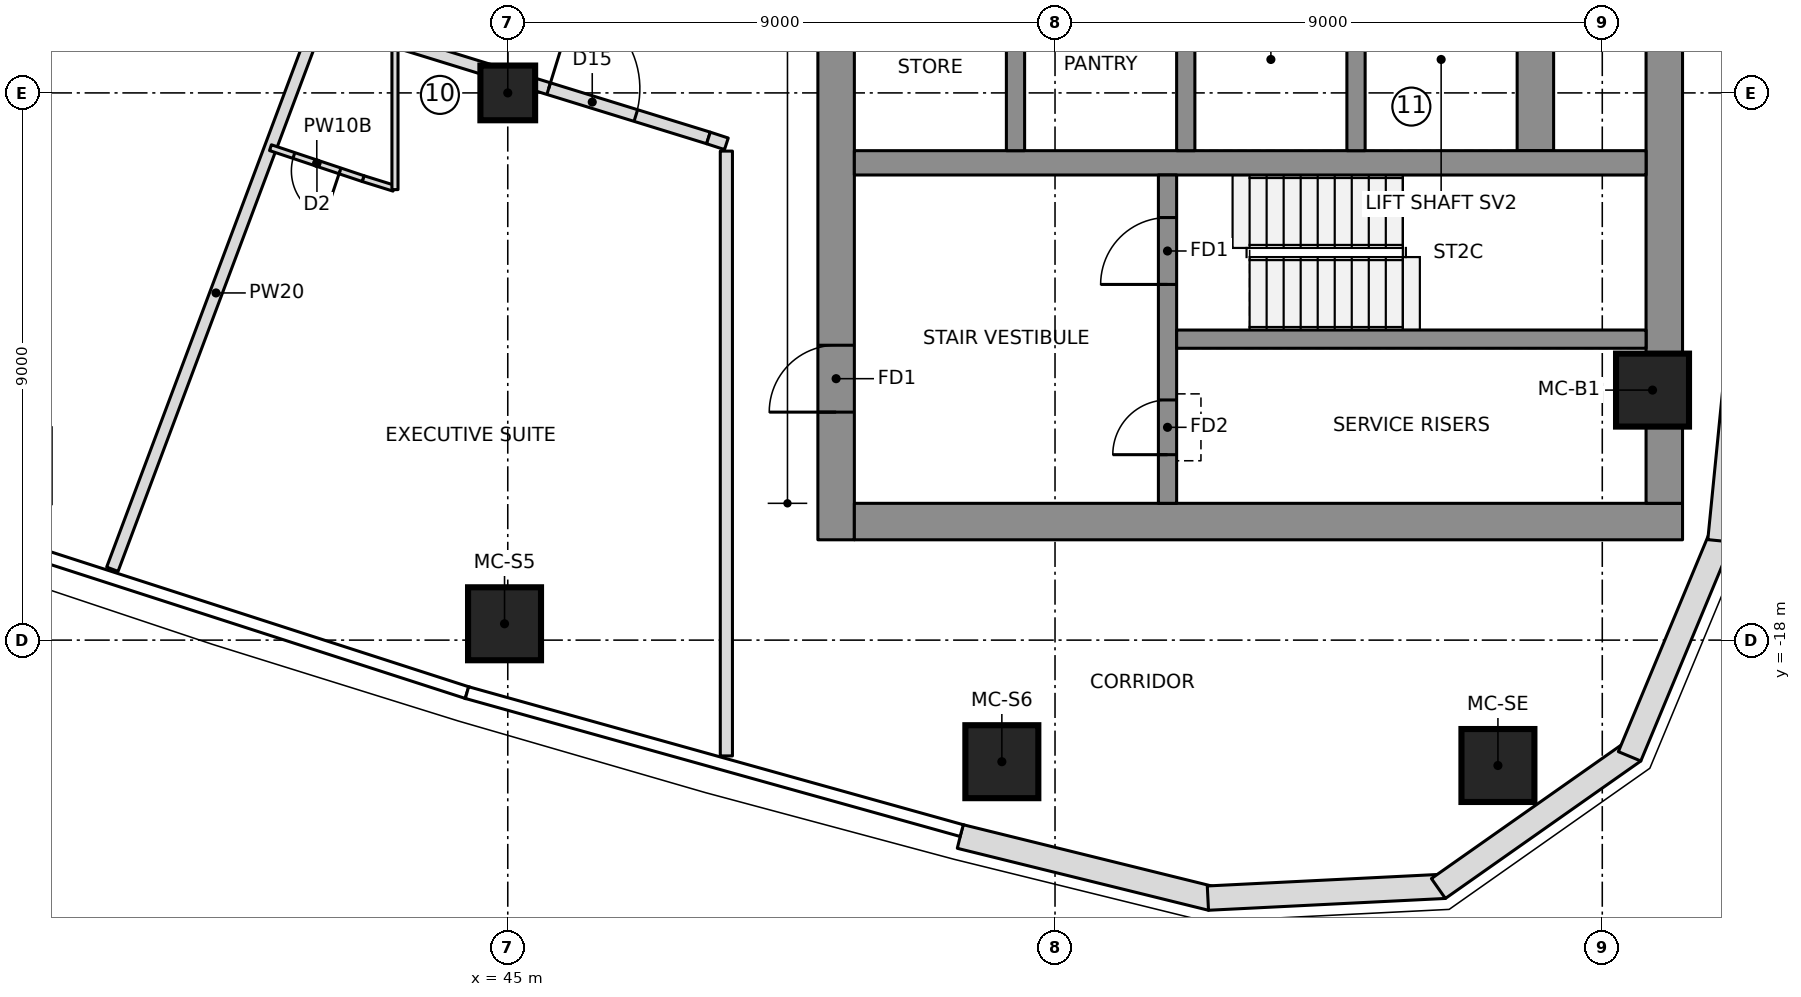
"""IFC4 building model, lengths in metres.
Left out: names, types, materials, properties, quantities, classifications, styles, units other than length and angle.
Written with IfcOpenShell. Run it as: python <this file> out.ifc"""

import sys

from ifc_helpers import new_model, si_unit, direction, frame, frame_2d, origin, origin_2d, place, context, subcontext, project, spatial, polyline, rectangle, outline, extrude, element, fill, save


model = new_model("IFC4")
c1 = context("Model", 3, precision=1e-05, world=origin(), true_north=direction((0.0, 1.0)))
c2 = subcontext(c1, "Body", "Model", "MODEL_VIEW")
j1 = project(units=[si_unit("LENGTHUNIT", "METRE"), si_unit("PLANEANGLEUNIT", "RADIAN")], contexts=[c1])
p1 = place(None, origin())
s1 = spatial("IfcSite", under=j1, at=p1, CompositionType="ELEMENT")
p2 = place(p1, origin())
s2 = spatial("IfcBuilding", under=s1, at=p2, CompositionType="ELEMENT")
p3 = place(p2, frame((0.0, 0.0, 231.45)))
s3 = spatial("IfcBuildingStorey", under=s2, at=p3, CompositionType="ELEMENT", Elevation=231.45)
p4 = place(p3, frame((50.4, -16.35, 0.0), z_axis=(0.0, 0.0, 1.0), x_axis=(0.0, 1.0, 0.0)))
e1 = element("IfcWall", 1, at=p4, inside=s3, PredefinedType="SHEAR", context=c2, shape_type="SweptSolid", body=[
    extrude(rectangle(XDim=9.7, YDim=0.6, at=frame_2d((4.85, 0.0))), origin(), (0.0, 0.0, 1.0), 3.55),
])
p5 = place(p4, frame((2.1, 0.0, 0.0)))
e2 = element("IfcOpeningElement", 2, at=p5, cuts=e1, PredefinedType="OPENING", context=c2, shape_type="SweptSolid", body=[
    extrude(rectangle(XDim=1.1, YDim=2.1, at=frame_2d((0.55, 1.05))), frame((0.0, 0.31, 0.0), z_axis=(0.0, -1.0, 0.0), x_axis=(1.0, 0.0, 0.0)), (0.0, 0.0, 1.0), 0.62),
])
p6 = place(p3, frame((50.7, -16.05, 0.0), z_axis=(0.0, 0.0, 1.0), x_axis=(1.0, 0.0, 0.0)))
e3 = element("IfcWall", 3, at=p6, inside=s3, PredefinedType="SHEAR", context=c2, shape_type="SweptSolid", body=[
    extrude(rectangle(XDim=13.62, YDim=0.6, at=frame_2d((6.81, 0.0))), origin(), (0.0, 0.0, 1.0), 3.55),
])
p7 = place(p3, frame((64.02, -15.75, 0.0), z_axis=(0.0, 0.0, 1.0), x_axis=(0.0, 1.0, 0.0)))
e4 = element("IfcWall", 4, at=p7, inside=s3, PredefinedType="SHEAR", context=c2, shape_type="SweptSolid", body=[
    extrude(rectangle(XDim=8.248, YDim=0.6, at=frame_2d((4.124, 0.0))), origin(), (0.0, 0.0, 1.0), 3.55),
])
p8 = place(p3, frame((61.9, -9.95, 0.0), z_axis=(0.0, 0.0, 1.0), x_axis=(0.0, 1.0, 0.0)))
e5 = element("IfcWall", 5, at=p8, inside=s3, PredefinedType="SHEAR", context=c2, shape_type="SweptSolid", body=[
    extrude(rectangle(XDim=19.9, YDim=0.6, at=frame_2d((9.95, 0.0))), origin(), (0.0, 0.0, 1.0), 3.55),
])
p9 = place(p3, frame((50.7, -10.15, 0.0), z_axis=(0.0, 0.0, 1.0), x_axis=(1.0, 0.0, 0.0)))
e6 = element("IfcWall", 6, at=p9, inside=s3, PredefinedType="SHEAR", context=c2, shape_type="SweptSolid", body=[
    extrude(rectangle(XDim=13.02, YDim=0.4, at=frame_2d((6.51, 0.0))), origin(), (0.0, 0.0, 1.0), 3.55),
])
for number, where, z_axis, x_axis in (
    (7, (53.35, -9.95, 0.0), (0.0, 0.0, 1.0), (0.0, 1.0, 0.0)),
    (8, (56.15, -9.95, 0.0), (0.0, 0.0, 1.0), (0.0, 1.0, 0.0)),
    (9, (58.95, -9.95, 0.0), (0.0, 0.0, 1.0), (0.0, 1.0, 0.0)),
):
    element("IfcWall", number, at=place(p3, frame(where, z_axis=z_axis, x_axis=x_axis)), inside=s3, PredefinedType="SHEAR", context=c2, shape_type="SweptSolid", body=[
        extrude(rectangle(XDim=3.0, YDim=0.3, at=frame_2d((1.5, 0.0))), origin(), (0.0, 0.0, 1.0), 3.55),
    ])
p10 = place(p3, frame((55.85, -15.75, 0.0), z_axis=(0.0, 0.0, 1.0), x_axis=(0.0, 1.0, 0.0)))
e10 = element("IfcWall", 10, at=p10, inside=s3, PredefinedType="SHEAR", context=c2, shape_type="SweptSolid", body=[
    extrude(rectangle(XDim=5.4, YDim=0.3, at=frame_2d((2.7, 0.0))), origin(), (0.0, 0.0, 1.0), 3.55),
])
p11 = place(p10, frame((3.6, 0.0, 0.0)))
e11 = element("IfcOpeningElement", 11, at=p11, cuts=e10, PredefinedType="OPENING", context=c2, shape_type="SweptSolid", body=[
    extrude(rectangle(XDim=1.1, YDim=2.1, at=frame_2d((0.55, 1.05))), frame((0.0, 0.16, 0.0), z_axis=(0.0, -1.0, 0.0), x_axis=(1.0, 0.0, 0.0)), (0.0, 0.0, 1.0), 0.32),
])
p12 = place(p10, frame((0.8, 0.0, 0.0)))
e12 = element("IfcOpeningElement", 12, at=p12, cuts=e10, PredefinedType="OPENING", context=c2, shape_type="SweptSolid", body=[
    extrude(rectangle(XDim=0.9, YDim=2.1, at=frame_2d((0.45, 1.05))), frame((0.0, 0.16, 0.0), z_axis=(0.0, -1.0, 0.0), x_axis=(1.0, 0.0, 0.0)), (0.0, 0.0, 1.0), 0.32),
])
p13 = place(p3, frame((56.0, -13.05, 0.0), z_axis=(0.0, 0.0, 1.0), x_axis=(1.0, 0.0, 0.0)))
e13 = element("IfcWall", 13, at=p13, inside=s3, PredefinedType="SHEAR", context=c2, shape_type="SweptSolid", body=[
    extrude(rectangle(XDim=7.72, YDim=0.3, at=frame_2d((3.86, 0.0))), origin(), (0.0, 0.0, 1.0), 3.55),
])
for number, where, z_axis, x_axis in (
    (14, (44.947, -17.731, 0.0), (0.0, 0.0, 1.0), (1.0, 0.0, 0.0)),
    (15, (53.125, -20.0, 0.0), (0.0, 0.0, 1.0), (1.0, 0.0, 0.0)),
    (16, (61.284, -20.062, 0.0), (0.0, 0.0, 1.0), (1.0, 0.0, 0.0)),
    (17, (63.826, -13.888, 0.0), (0.0, 0.0, 1.0), (1.0, 0.0, 0.0)),
):
    element("IfcColumn", number, at=place(p3, frame(where, z_axis=z_axis, x_axis=x_axis)), inside=s3, PredefinedType="COLUMN", context=c2, shape_type="SweptSolid", body=[
        extrude(rectangle(XDim=1.2, YDim=1.2, at=origin_2d()), origin(), (0.0, 0.0, 1.0), 3.55),
    ])
p14 = place(p3, frame((45.0, -9.0, 0.0), z_axis=(0.0, 0.0, 1.0), x_axis=(1.0, 0.0, 0.0)))
e18 = element("IfcColumn", 18, at=p14, inside=s3, PredefinedType="COLUMN", context=c2, shape_type="SweptSolid", body=[
    extrude(rectangle(XDim=0.9, YDim=0.9, at=origin_2d()), origin(), (0.0, 0.0, 1.0), 3.55),
])
p15 = place(p3, frame((52.441, -21.23, 0.0), z_axis=(0.0, 0.0, 1.0), x_axis=(0.970902342456, -0.23947576373, 0.0)))
e19 = element("IfcWall", 19, at=p15, inside=s3, PredefinedType="NOTDEFINED", context=c2, shape_type="SweptSolid", body=[
    extrude(outline(polyline([(0.0, -0.2), (4.255, -0.2), (4.197, 0.2), (0.0, 0.2), (0.0, -0.2)])), origin(), (0.0, 0.0, 1.0), 3.25),
])
p16 = place(p3, frame((56.543, -22.242, 0.0), z_axis=(0.0, 0.0, 1.0), x_axis=(0.998758875872, 0.049806705046, 0.0)))
e20 = element("IfcWall", 20, at=p16, inside=s3, PredefinedType="NOTDEFINED", context=c2, shape_type="SweptSolid", body=[
    extrude(outline(polyline([(-0.029, -0.2), (3.871, -0.2), (3.756, 0.2), (0.029, 0.2), (-0.029, -0.2)])), origin(), (0.0, 0.0, 1.0), 3.25),
])
p17 = place(p3, frame((60.352, -22.052, 0.0), z_axis=(0.0, 0.0, 1.0), x_axis=(0.817942545532, 0.575299915009, 0.0)))
e21 = element("IfcWall", 21, at=p17, inside=s3, PredefinedType="NOTDEFINED", context=c2, shape_type="SweptSolid", body=[
    extrude(outline(polyline([(-0.058, -0.2), (3.871, -0.2), (3.756, 0.2), (0.058, 0.2), (-0.058, -0.2)])), origin(), (0.0, 0.0, 1.0), 3.25),
])
p18 = place(p3, frame((63.471, -19.858, 0.0), z_axis=(0.0, 0.0, 1.0), x_axis=(0.3844335483, 0.923152667191, 0.0)))
e22 = element("IfcWall", 22, at=p18, inside=s3, PredefinedType="NOTDEFINED", context=c2, shape_type="SweptSolid", body=[
    extrude(outline(polyline([(-0.058, -0.2), (3.843, -0.2), (3.784, 0.2), (0.058, 0.2), (-0.058, -0.2)])), origin(), (0.0, 0.0, 1.0), 3.25),
])
p19 = place(p3, frame((64.938, -16.337, 0.0), z_axis=(0.0, 0.0, 1.0), x_axis=(0.098718218066, 0.995115427185, 0.0)))
e23 = element("IfcWall", 23, at=p19, inside=s3, PredefinedType="NOTDEFINED", context=c2, shape_type="SweptSolid", body=[
    extrude(outline(polyline([(-0.03, -0.2), (4.096, -0.2), (4.09, 0.2), (0.03, 0.2), (-0.03, -0.2)])), origin(), (0.0, 0.0, 1.0), 3.25),
])
p20 = place(p3, frame((38.497, -16.834, 0.0), z_axis=(0.0, 0.0, 1.0), x_axis=(0.35112895446, 0.936327110224, 0.0)))
e24 = element("IfcWall", 24, at=p20, inside=s3, PredefinedType="PARTITIONING", context=c2, shape_type="SweptSolid", body=[
    extrude(rectangle(XDim=9.706, YDim=0.2, at=frame_2d((4.853, 0.0))), origin(), (0.0, 0.0, 1.0), 3.25),
])
p21 = place(p3, frame((43.128, -10.568, 0.0), z_axis=(0.0, 0.0, 1.0), x_axis=(-0.954618903587, 0.297830067176, 0.0)))
e25 = element("IfcWall", 25, at=p21, inside=s3, PredefinedType="PARTITIONING", context=c2, shape_type="SweptSolid", body=[
    extrude(rectangle(XDim=0.531, YDim=0.1, at=frame_2d((0.266, 0.0))), origin(), (0.0, 0.0, 1.0), 3.25),
])
p22 = place(p3, frame((42.621, -10.409, 0.0), z_axis=(0.0, 0.0, 1.0), x_axis=(-0.948485479965, 0.3168206027, 0.0)))
e26 = element("IfcWall", 26, at=p22, inside=s3, PredefinedType="PARTITIONING", context=c2, shape_type="SweptSolid", body=[
    extrude(rectangle(XDim=1.606, YDim=0.1, at=frame_2d((0.803, 0.0))), origin(), (0.0, 0.0, 1.0), 3.25),
])
p23 = place(p22, frame((0.4, 0.0, 0.0)))
e27 = element("IfcOpeningElement", 27, at=p23, cuts=e26, PredefinedType="OPENING", context=c2, shape_type="SweptSolid", body=[
    extrude(rectangle(XDim=0.8, YDim=2.1, at=frame_2d((0.4, 1.05))), frame((0.0, 0.06, 0.0), z_axis=(0.0, -1.0, 0.0), x_axis=(1.0, 0.0, 0.0)), (0.0, 0.0, 1.0), 0.12),
])
p24 = place(p3, frame((43.145, -8.165, 0.0), z_axis=(0.0, 0.0, 1.0), x_axis=(0.0, -1.0, 0.0)))
e28 = element("IfcWall", 28, at=p24, inside=s3, PredefinedType="PARTITIONING", context=c2, shape_type="SweptSolid", body=[
    extrude(rectangle(XDim=2.425, YDim=0.1, at=frame_2d((1.213, 0.0))), origin(), (0.0, 0.0, 1.0), 3.25),
])
p25 = place(p3, frame((41.898, -7.764, 0.0), z_axis=(0.0, 0.0, 1.0), x_axis=(0.955502033518, -0.294984514752, 0.0)))
e29 = element("IfcWall", 29, at=p25, inside=s3, PredefinedType="PARTITIONING", context=c2, shape_type="SweptSolid", body=[
    extrude(rectangle(XDim=6.7, YDim=0.2, at=frame_2d((3.35, 0.0))), origin(), (0.0, 0.0, 1.0), 3.25),
])
p26 = place(p25, frame((3.95, 0.0, 0.0)))
e30 = element("IfcOpeningElement", 30, at=p26, cuts=e29, PredefinedType="OPENING", context=c2, shape_type="SweptSolid", body=[
    extrude(rectangle(XDim=1.5, YDim=2.1, at=frame_2d((0.75, 1.05))), frame((0.0, 0.11, 0.0), z_axis=(0.0, -1.0, 0.0), x_axis=(1.0, 0.0, 0.0)), (0.0, 0.0, 1.0), 0.22),
])
p27 = place(p3, frame((48.3, -9.741, 0.0), z_axis=(0.0, 0.0, 1.0), x_axis=(0.950709666312, -0.31008245739, 0.0)))
e31 = element("IfcWall", 31, at=p27, inside=s3, PredefinedType="PARTITIONING", context=c2, shape_type="SweptSolid", body=[
    extrude(rectangle(XDim=0.31, YDim=0.2, at=frame_2d((0.155, 0.0))), origin(), (0.0, 0.0, 1.0), 3.25),
])
p28 = place(p3, frame((48.595, -9.957, 0.0), z_axis=(0.0, 0.0, 1.0), x_axis=(0.0, -1.0, 0.0)))
e32 = element("IfcWall", 32, at=p28, inside=s3, PredefinedType="PARTITIONING", context=c2, shape_type="SweptSolid", body=[
    extrude(rectangle(XDim=9.947, YDim=0.2, at=frame_2d((4.974, 0.0))), origin(), (0.0, 0.0, 1.0), 3.25),
])
p29 = place(p23, origin())
e33 = element("IfcDoor", 33, at=p29, inside=s3, OperationType="SINGLE_SWING_LEFT", PredefinedType="DOOR", context=c2, shape_type="SweptSolid", body=[
    extrude(rectangle(XDim=0.8, YDim=2.1, at=frame_2d((0.4, 1.05))), frame((0.0, 0.025, 0.0), z_axis=(0.0, -1.0, 0.0), x_axis=(1.0, 0.0, 0.0)), (0.0, 0.0, 1.0), 0.05),
])
fill(e27, e33)
p30 = place(p26, origin())
e34 = element("IfcDoor", 34, at=p30, inside=s3, OperationType="DOUBLE_DOOR_SINGLE_SWING", PredefinedType="DOOR", context=c2, shape_type="SweptSolid", body=[
    extrude(rectangle(XDim=1.5, YDim=2.1, at=frame_2d((0.75, 1.05))), frame((0.0, 0.025, 0.0), z_axis=(0.0, -1.0, 0.0), x_axis=(1.0, 0.0, 0.0)), (0.0, 0.0, 1.0), 0.05),
])
fill(e30, e34)
p31 = place(p11, origin())
e35 = element("IfcDoor", 35, at=p31, inside=s3, OperationType="SINGLE_SWING_RIGHT", PredefinedType="DOOR", context=c2, shape_type="SweptSolid", body=[
    extrude(rectangle(XDim=1.1, YDim=2.1, at=frame_2d((0.55, 1.05))), frame((0.0, 0.025, 0.0), z_axis=(0.0, -1.0, 0.0), x_axis=(1.0, 0.0, 0.0)), (0.0, 0.0, 1.0), 0.05),
])
fill(e11, e35)
p32 = place(p5, origin())
e36 = element("IfcDoor", 36, at=p32, inside=s3, OperationType="SINGLE_SWING_RIGHT", PredefinedType="DOOR", context=c2, shape_type="SweptSolid", body=[
    extrude(rectangle(XDim=1.1, YDim=2.1, at=frame_2d((0.55, 1.05))), frame((0.0, 0.025, 0.0), z_axis=(0.0, -1.0, 0.0), x_axis=(1.0, 0.0, 0.0)), (0.0, 0.0, 1.0), 0.05),
])
fill(e2, e36)
p33 = place(p12, origin())
e37 = element("IfcDoor", 37, at=p33, inside=s3, OperationType="SINGLE_SWING_LEFT", PredefinedType="DOOR", context=c2, shape_type="SweptSolid", body=[
    extrude(rectangle(XDim=0.9, YDim=2.1, at=frame_2d((0.45, 1.05))), frame((0.0, 0.025, 0.0), z_axis=(0.0, -1.0, 0.0), x_axis=(1.0, 0.0, 0.0)), (0.0, 0.0, 1.0), 0.05),
])
fill(e12, e37)
save(model, sys.argv[1])
